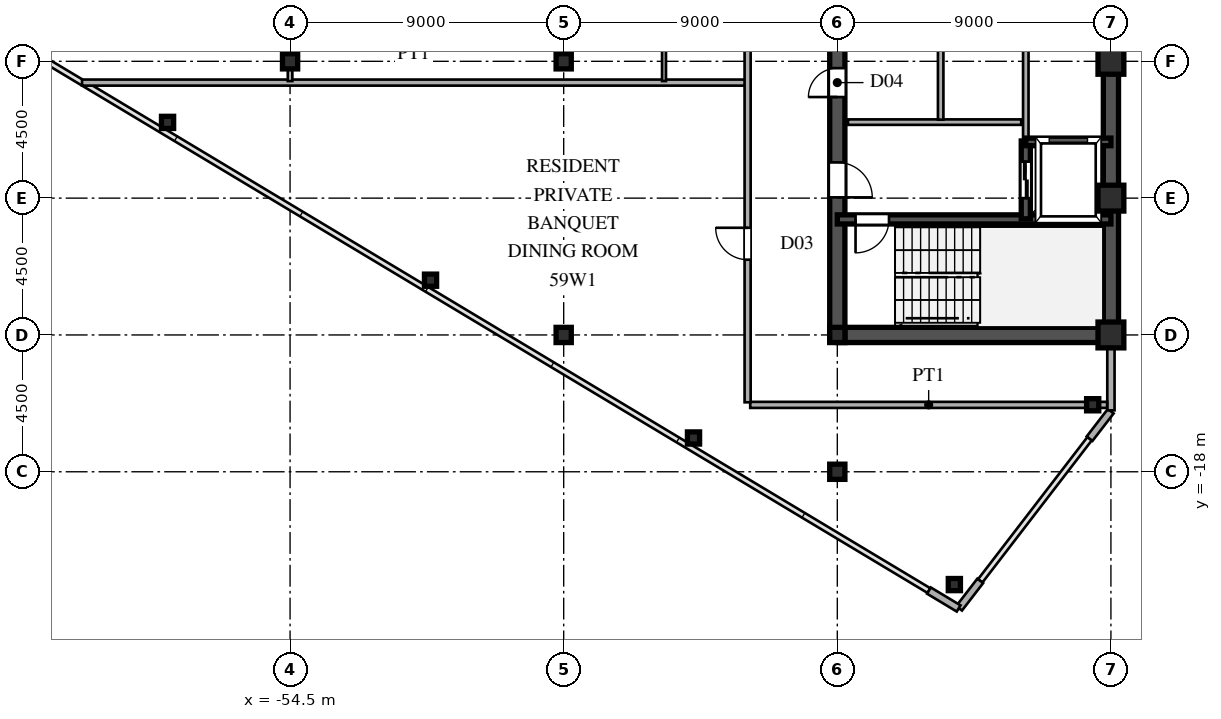
"""IFC4 building model, lengths in metres.
Left out: names, types, materials, properties, quantities, classifications, styles, units other than length and angle.
Written with IfcOpenShell. Run it as: python <this file> out.ifc"""

import sys

from ifc_helpers import new_model, si_unit, direction, frame, frame_2d, origin, origin_2d, place, context, subcontext, project, spatial, rectangle, hollow_rectangle, i_section, extrude, source, transform, mapped, element, fill, save


model = new_model("IFC4")
c1 = context("Model", 3, precision=1e-05, world=origin(), true_north=direction((0.0, 1.0)))
c2 = subcontext(c1, "Body", "Model", "MODEL_VIEW")
j1 = project(units=[si_unit("LENGTHUNIT", "METRE"), si_unit("PLANEANGLEUNIT", "RADIAN")], contexts=[c1])
p1 = place(None, origin())
s1 = spatial("IfcSite", under=j1, at=p1, CompositionType="ELEMENT")
p2 = place(p1, origin())
s2 = spatial("IfcBuilding", under=s1, at=p2, CompositionType="ELEMENT")
p3 = place(p2, frame((0.0, 0.0, 221.1)))
s3 = spatial("IfcBuildingStorey", under=s2, at=p3, CompositionType="ELEMENT", Elevation=221.1)
m1 = source(origin(), c2, "Body", "SweptSolid", [
    extrude(hollow_rectangle(XDim=0.85, YDim=0.85, WallThickness=0.036, at=origin_2d()), origin(), (0.0, 0.0, 1.0), 3.6),
])
for number, where, z_axis, x_axis in (
    (1, (-27.5, -13.5, 0.0), (0.0, 0.0, 1.0), (1.0, 0.0, 0.0)),
    (2, (-27.5, -9.0, 0.0), (0.0, 0.0, 1.0), (1.0, 0.0, 0.0)),
    (3, (-27.5, -4.5, 0.0), (0.0, 0.0, 1.0), (1.0, 0.0, 0.0)),
):
    element("IfcColumn", number, at=place(p3, frame(where, z_axis=z_axis, x_axis=x_axis)), inside=s3, PredefinedType="COLUMN", context=c2, shape_type="MappedRepresentation", body=[
        mapped(m1, transform((0.0, 0.0, 0.0), scale=1.0)),
    ])
m2 = source(origin(), c2, "Body", "SweptSolid", [
    extrude(i_section(OverallWidth=0.5, OverallDepth=0.5, WebThickness=0.02, FlangeThickness=0.032, at=origin_2d()), origin(), (0.0, 0.0, 1.0), 3.6),
])
for number, where, z_axis, x_axis in (
    (4, (-36.5, -18.0, 0.0), (0.0, 0.0, 1.0), (1.0, 0.0, 0.0)),
    (5, (-36.5, -13.5, 0.0), (0.0, 0.0, 1.0), (1.0, 0.0, 0.0)),
    (6, (-45.5, -13.5, 0.0), (0.0, 0.0, 1.0), (1.0, 0.0, 0.0)),
    (7, (-45.5, -4.5, 0.0), (0.0, 0.0, 1.0), (1.0, 0.0, 0.0)),
    (8, (-54.5, -4.5, 0.0), (0.0, 0.0, 1.0), (1.0, 0.0, 0.0)),
):
    element("IfcColumn", number, at=place(p3, frame(where, z_axis=z_axis, x_axis=x_axis)), inside=s3, PredefinedType="COLUMN", context=c2, shape_type="MappedRepresentation", body=[
        mapped(m2, transform((0.0, 0.0, 0.0), scale=1.0)),
    ])
m3 = source(origin(), c2, "Body", "SweptSolid", [
    extrude(hollow_rectangle(XDim=0.4, YDim=0.4, WallThickness=0.016, at=origin_2d()), origin(), (0.0, 0.0, 1.0), 3.6),
])
for number, where, z_axis, x_axis in (
    (9, (-28.1, -15.796, 0.0), (0.0, 0.0, 1.0), (1.0, 0.0, 0.0)),
    (10, (-32.65, -21.71, 0.0), (0.0, 0.0, 1.0), (1.0, 0.0, 0.0)),
    (11, (-41.23, -16.889, 0.0), (0.0, 0.0, 1.0), (1.0, 0.0, 0.0)),
    (12, (-49.88, -11.699, 0.0), (0.0, 0.0, 1.0), (1.0, 0.0, 0.0)),
    (13, (-58.53, -6.509, 0.0), (0.0, 0.0, 1.0), (1.0, 0.0, 0.0)),
):
    element("IfcColumn", number, at=place(p3, frame(where, z_axis=z_axis, x_axis=x_axis)), inside=s3, PredefinedType="COLUMN", context=c2, shape_type="MappedRepresentation", body=[
        mapped(m3, transform((0.0, 0.0, 0.0), scale=1.0)),
    ])
p4 = place(p3, frame((-27.5, -15.98, 0.0), z_axis=(0.0, 0.0, 1.0), x_axis=(0.0, 1.0, 0.0)))
e14 = element("IfcWall", 14, at=p4, inside=s3, PredefinedType="SOLIDWALL", context=c2, shape_type="SweptSolid", body=[
    extrude(rectangle(XDim=1.605, YDim=0.24, at=frame_2d((0.803, 0.0))), origin(), (0.0, 0.0, 1.0), 3.34),
])
p5 = place(p3, frame((-27.5, -14.375, 0.0), z_axis=(0.0, 0.0, 1.0), x_axis=(0.0, 1.0, 0.0)))
e15 = element("IfcWall", 15, at=p5, inside=s3, PredefinedType="SOLIDWALL", context=c2, shape_type="SweptSolid", body=[
    extrude(rectangle(XDim=0.62, YDim=0.24, at=frame_2d((0.31, 0.0))), origin(), (0.0, 0.0, 1.0), 2.84),
])
for number, where, z_axis, x_axis in (
    (16, (-33.486, -21.908, 0.0), (0.0, 0.0, 1.0), (0.857, -0.515, 0.0)),
    (17, (-32.494, -22.492, 0.0), (0.0, 0.0, 1.0), (0.61, 0.793, 0.0)),
    (18, (-28.201, -16.912, 0.0), (0.0, 0.0, 1.0), (0.61, 0.793, 0.0)),
):
    element("IfcWall", number, at=place(p3, frame(where, z_axis=z_axis, x_axis=x_axis)), inside=s3, PredefinedType="SOLIDWALL", context=c2, shape_type="SweptSolid", body=[
        extrude(rectangle(XDim=1.14, YDim=0.24, at=frame_2d((0.57, 0.0))), origin(), (0.0, 0.0, 1.0), 3.34),
    ])
p6 = place(p3, frame((-27.5, -13.5, 0.0), z_axis=(0.0, 0.0, 1.0), x_axis=(0.0, 1.0, 0.0)))
e19 = element("IfcWall", 19, at=p6, inside=s3, PredefinedType="SHEAR", context=c2, shape_type="SweptSolid", body=[
    extrude(rectangle(XDim=12.2, YDim=0.5, at=frame_2d((6.1, 0.0))), origin(), (0.0, 0.0, 1.0), 3.34),
])
p7 = place(p3, frame((-36.5, -13.5, 0.0), z_axis=(0.0, 0.0, 1.0), x_axis=(1.0, 0.0, 0.0)))
e20 = element("IfcWall", 20, at=p7, inside=s3, PredefinedType="SHEAR", context=c2, shape_type="SweptSolid", body=[
    extrude(rectangle(XDim=9.0, YDim=0.5, at=frame_2d((4.5, 0.0))), origin(), (0.0, 0.0, 1.0), 3.34),
])
p8 = place(p3, frame((-36.5, -13.65, 0.0), z_axis=(0.0, 0.0, 1.0), x_axis=(0.0, 1.0, 0.0)))
e21 = element("IfcWall", 21, at=p8, inside=s3, PredefinedType="SHEAR", context=c2, shape_type="SweptSolid", body=[
    extrude(rectangle(XDim=7.15, YDim=0.5, at=frame_2d((3.575, 0.0))), origin(), (0.0, 0.0, 1.0), 3.34),
])
p9 = place(p8, frame((4.675, 0.0, 0.0)))
e22 = element("IfcOpeningElement", 22, at=p9, cuts=e21, PredefinedType="OPENING", context=c2, shape_type="SweptSolid", body=[
    extrude(rectangle(XDim=1.15, YDim=2.2, at=frame_2d((0.575, 1.1))), frame((0.0, 0.26, 0.0), z_axis=(0.0, -1.0, 0.0), x_axis=(1.0, 0.0, 0.0)), (0.0, 0.0, 1.0), 0.52),
])
p10 = place(p3, frame((-36.5, -6.5, 0.0), z_axis=(0.0, 0.0, 1.0), x_axis=(0.0, 1.0, 0.0)))
e23 = element("IfcWall", 23, at=p10, inside=s3, PredefinedType="SHEAR", context=c2, shape_type="SweptSolid", body=[
    extrude(rectangle(XDim=2.6, YDim=0.5, at=frame_2d((1.3, 0.0))), origin(), (0.0, 0.0, 1.0), 3.34),
])
p11 = place(p10, frame((0.825, 0.0, 0.0)))
e24 = element("IfcOpeningElement", 24, at=p11, cuts=e23, PredefinedType="OPENING", context=c2, shape_type="SweptSolid", body=[
    extrude(rectangle(XDim=0.95, YDim=2.15, at=frame_2d((0.475, 1.075))), frame((0.0, 0.26, 0.0), z_axis=(0.0, -1.0, 0.0), x_axis=(1.0, 0.0, 0.0)), (0.0, 0.0, 1.0), 0.52),
])
p12 = place(p3, frame((-36.5, -9.7, 0.0), z_axis=(0.0, 0.0, 1.0), x_axis=(1.0, 0.0, 0.0)))
e25 = element("IfcWall", 25, at=p12, inside=s3, PredefinedType="SHEAR", context=c2, shape_type="SweptSolid", body=[
    extrude(rectangle(XDim=9.0, YDim=0.3, at=frame_2d((4.5, 0.0))), origin(), (0.0, 0.0, 1.0), 3.34),
])
p13 = place(p12, frame((0.6, 0.0, 0.0)))
e26 = element("IfcOpeningElement", 26, at=p13, cuts=e25, PredefinedType="OPENING", context=c2, shape_type="SweptSolid", body=[
    extrude(rectangle(XDim=1.1, YDim=2.2, at=frame_2d((0.55, 1.1))), frame((0.0, 0.16, 0.0), z_axis=(0.0, -1.0, 0.0), x_axis=(1.0, 0.0, 0.0)), (0.0, 0.0, 1.0), 0.32),
])
p14 = place(p3, frame((-30.3, -7.15, 0.0), z_axis=(0.0, 0.0, 1.0), x_axis=(1.0, 0.0, 0.0)))
e27 = element("IfcWall", 27, at=p14, inside=s3, PredefinedType="SHEAR", context=c2, shape_type="SweptSolid", body=[
    extrude(rectangle(XDim=2.8, YDim=0.25, at=frame_2d((1.4, 0.0))), origin(), (0.0, 0.0, 1.0), 3.34),
])
p15 = place(p3, frame((-30.3, -9.68, 0.0), z_axis=(0.0, 0.0, 1.0), x_axis=(0.0, 1.0, 0.0)))
e28 = element("IfcWall", 28, at=p15, inside=s3, PredefinedType="SHEAR", context=c2, shape_type="SweptSolid", body=[
    extrude(rectangle(XDim=2.56, YDim=0.3, at=frame_2d((1.28, 0.0))), origin(), (0.0, 0.0, 1.0), 3.34),
])
p16 = place(p15, frame((0.68, 0.0, 0.0)))
e29 = element("IfcOpeningElement", 29, at=p16, cuts=e28, PredefinedType="OPENING", context=c2, shape_type="SweptSolid", body=[
    extrude(rectangle(XDim=1.2, YDim=2.25, at=frame_2d((0.6, 1.125))), frame((0.0, 0.16, 0.0), z_axis=(0.0, -1.0, 0.0), x_axis=(1.0, 0.0, 0.0)), (0.0, 0.0, 1.0), 0.32),
])
p17 = place(p3, frame((-36.15, -6.5, 0.0), z_axis=(0.0, 0.0, 1.0), x_axis=(1.0, 0.0, 0.0)))
e30 = element("IfcWall", 30, at=p17, inside=s3, PredefinedType="PARTITIONING", context=c2, shape_type="SweptSolid", body=[
    extrude(rectangle(XDim=5.7, YDim=0.18, at=frame_2d((2.85, 0.0))), origin(), (0.0, 0.0, 1.0), 3.34),
])
p18 = place(p3, frame((-33.1, -6.42, 0.0), z_axis=(0.0, 0.0, 1.0), x_axis=(0.0, 1.0, 0.0)))
e31 = element("IfcWall", 31, at=p18, inside=s3, PredefinedType="PARTITIONING", context=c2, shape_type="SweptSolid", body=[
    extrude(rectangle(XDim=5.04, YDim=0.18, at=frame_2d((2.52, 0.0))), origin(), (0.0, 0.0, 1.0), 3.34),
])
p19 = place(p3, frame((-30.3, -7.12, 0.0), z_axis=(0.0, 0.0, 1.0), x_axis=(0.0, 1.0, 0.0)))
e32 = element("IfcWall", 32, at=p19, inside=s3, PredefinedType="PARTITIONING", context=c2, shape_type="SweptSolid", body=[
    extrude(rectangle(XDim=5.74, YDim=0.18, at=frame_2d((2.87, 0.0))), origin(), (0.0, 0.0, 1.0), 3.34),
])
p20 = place(p3, frame((-39.365, -15.8, 0.0), z_axis=(0.0, 0.0, 1.0), x_axis=(1.0, 0.0, 0.0)))
e33 = element("IfcWall", 33, at=p20, inside=s3, PredefinedType="PARTITIONING", context=c2, shape_type="SweptSolid", body=[
    extrude(rectangle(XDim=11.74, YDim=0.2, at=frame_2d((5.87, 0.0))), origin(), (0.0, 0.0, 1.0), 3.34),
])
p21 = place(p3, frame((-61.343, -5.2, 0.0), z_axis=(0.0, 0.0, 1.0), x_axis=(1.0, 0.0, 0.0)))
e34 = element("IfcWall", 34, at=p21, inside=s3, PredefinedType="PARTITIONING", context=c2, shape_type="SweptSolid", body=[
    extrude(rectangle(XDim=21.813, YDim=0.2, at=frame_2d((10.906, 0.0))), origin(), (0.0, 0.0, 1.0), 3.34),
])
p22 = place(p3, frame((-54.5, -5.15, 0.0), z_axis=(0.0, 0.0, 1.0), x_axis=(0.0, 1.0, 0.0)))
e35 = element("IfcWall", 35, at=p22, inside=s3, PredefinedType="PARTITIONING", context=c2, shape_type="SweptSolid", body=[
    extrude(rectangle(XDim=0.63, YDim=0.15, at=frame_2d((0.315, 0.0))), origin(), (0.0, 0.0, 1.0), 3.34),
])
p23 = place(p3, frame((-54.5, -4.52, 0.0), z_axis=(0.0, 0.0, 1.0), x_axis=(0.0, 1.0, 0.0)))
e36 = element("IfcWall", 36, at=p23, inside=s3, PredefinedType="PARTITIONING", context=c2, shape_type="SweptSolid", body=[
    extrude(rectangle(XDim=9.04, YDim=0.15, at=frame_2d((4.52, 0.0))), origin(), (0.0, 0.0, 1.0), 2.44),
])
p24 = place(p23, frame((5.245, 0.0, 0.0)))
e37 = element("IfcOpeningElement", 37, at=p24, cuts=e36, PredefinedType="OPENING", context=c2, shape_type="SweptSolid", body=[
    extrude(rectangle(XDim=0.95, YDim=2.15, at=frame_2d((0.475, 1.075))), frame((0.0, 0.085, 0.0), z_axis=(0.0, -1.0, 0.0), x_axis=(1.0, 0.0, 0.0)), (0.0, 0.0, 1.0), 0.17),
])
p25 = place(p3, frame((-42.2, -5.15, 0.0), z_axis=(0.0, 0.0, 1.0), x_axis=(0.0, 1.0, 0.0)))
e38 = element("IfcWall", 38, at=p25, inside=s3, PredefinedType="PARTITIONING", context=c2, shape_type="SweptSolid", body=[
    extrude(rectangle(XDim=3.354, YDim=0.13, at=frame_2d((1.677, 0.0))), origin(), (0.0, 0.0, 1.0), 3.34),
])
p26 = place(p3, frame((-39.45, -15.715, 0.0), z_axis=(0.0, 0.0, 1.0), x_axis=(0.0, 1.0, 0.0)))
e39 = element("IfcWall", 39, at=p26, inside=s3, PredefinedType="PARTITIONING", context=c2, shape_type="SweptSolid", body=[
    extrude(rectangle(XDim=31.43, YDim=0.2, at=frame_2d((15.715, 0.0))), origin(), (0.0, 0.0, 1.0), 3.34),
])
p27 = place(p26, frame((4.69, 0.0, 0.0)))
e40 = element("IfcOpeningElement", 40, at=p27, cuts=e39, PredefinedType="OPENING", context=c2, shape_type="SweptSolid", body=[
    extrude(rectangle(XDim=1.05, YDim=2.25, at=frame_2d((0.525, 1.125))), frame((0.0, 0.11, 0.0), z_axis=(0.0, -1.0, 0.0), x_axis=(1.0, 0.0, 0.0)), (0.0, 0.0, 1.0), 0.22),
])
p28 = place(p26, frame((16.198, 0.0, 0.0)))
e41 = element("IfcOpeningElement", 41, at=p28, cuts=e39, PredefinedType="OPENING", context=c2, shape_type="SweptSolid", body=[
    extrude(rectangle(XDim=1.05, YDim=2.25, at=frame_2d((0.525, 1.125))), frame((0.0, 0.11, 0.0), z_axis=(0.0, -1.0, 0.0), x_axis=(1.0, 0.0, 0.0)), (0.0, 0.0, 1.0), 0.22),
])
p29 = place(p26, frame((24.188, 0.0, 0.0)))
e42 = element("IfcOpeningElement", 42, at=p29, cuts=e39, PredefinedType="OPENING", context=c2, shape_type="SweptSolid", body=[
    extrude(rectangle(XDim=1.05, YDim=2.25, at=frame_2d((0.525, 1.125))), frame((0.0, 0.11, 0.0), z_axis=(0.0, -1.0, 0.0), x_axis=(1.0, 0.0, 0.0)), (0.0, 0.0, 1.0), 0.22),
])
m4 = source(origin(), c2, "Body", "SweptSolid", [
    extrude(rectangle(XDim=1.15, YDim=2.2, at=frame_2d((0.575, 1.1))), frame((0.0, 0.025, 0.0), z_axis=(0.0, -1.0, 0.0), x_axis=(1.0, 0.0, 0.0)), (0.0, 0.0, 1.0), 0.05),
])
p30 = place(p9, frame((1.15, 0.0, 0.0), z_axis=(0.0, 0.0, 1.0), x_axis=(-1.0, 0.0, 0.0)))
e43 = element("IfcDoor", 43, at=p30, inside=s3, OperationType="SINGLE_SWING_LEFT", PredefinedType="DOOR", context=c2, shape_type="MappedRepresentation", body=[
    mapped(m4, transform((0.0, 0.0, 0.0), scale=1.0)),
])
fill(e22, e43)
m5 = source(origin(), c2, "Body", "SweptSolid", [
    extrude(rectangle(XDim=0.95, YDim=2.15, at=frame_2d((0.475, 1.075))), frame((0.0, 0.025, 0.0), z_axis=(0.0, -1.0, 0.0), x_axis=(1.0, 0.0, 0.0)), (0.0, 0.0, 1.0), 0.05),
])
p31 = place(p11, origin())
e44 = element("IfcDoor", 44, at=p31, inside=s3, OperationType="SINGLE_SWING_LEFT", PredefinedType="DOOR", context=c2, shape_type="MappedRepresentation", body=[
    mapped(m5, transform((0.0, 0.0, 0.0), scale=1.0)),
])
fill(e24, e44)
m6 = source(origin(), c2, "Body", "SweptSolid", [
    extrude(rectangle(XDim=1.1, YDim=2.2, at=frame_2d((0.55, 1.1))), frame((0.0, 0.025, 0.0), z_axis=(0.0, -1.0, 0.0), x_axis=(1.0, 0.0, 0.0)), (0.0, 0.0, 1.0), 0.05),
])
p32 = place(p13, frame((1.1, 0.0, 0.0), z_axis=(0.0, 0.0, 1.0), x_axis=(-1.0, 0.0, 0.0)))
e45 = element("IfcDoor", 45, at=p32, inside=s3, OperationType="SINGLE_SWING_LEFT", PredefinedType="DOOR", context=c2, shape_type="MappedRepresentation", body=[
    mapped(m6, transform((0.0, 0.0, 0.0), scale=1.0)),
])
fill(e26, e45)
m7 = source(origin(), c2, "Body", "SweptSolid", [
    extrude(rectangle(XDim=1.2, YDim=2.25, at=frame_2d((0.6, 1.125))), frame((0.0, 0.025, 0.0), z_axis=(0.0, -1.0, 0.0), x_axis=(1.0, 0.0, 0.0)), (0.0, 0.0, 1.0), 0.05),
])
p33 = place(p16, origin())
e46 = element("IfcDoor", 46, at=p33, inside=s3, OperationType="DOUBLE_DOOR_SLIDING", PredefinedType="DOOR", context=c2, shape_type="MappedRepresentation", body=[
    mapped(m7, transform((0.0, 0.0, 0.0), scale=1.0)),
])
fill(e29, e46)
m8 = source(origin(), c2, "Body", "SweptSolid", [
    extrude(rectangle(XDim=1.05, YDim=2.25, at=frame_2d((0.525, 1.125))), frame((0.0, 0.025, 0.0), z_axis=(0.0, -1.0, 0.0), x_axis=(1.0, 0.0, 0.0)), (0.0, 0.0, 1.0), 0.05),
])
p34 = place(p27, origin())
e47 = element("IfcDoor", 47, at=p34, inside=s3, OperationType="SINGLE_SWING_RIGHT", PredefinedType="DOOR", context=c2, shape_type="MappedRepresentation", body=[
    mapped(m8, transform((0.0, 0.0, 0.0), scale=1.0)),
])
fill(e40, e47)
save(model, sys.argv[1])
